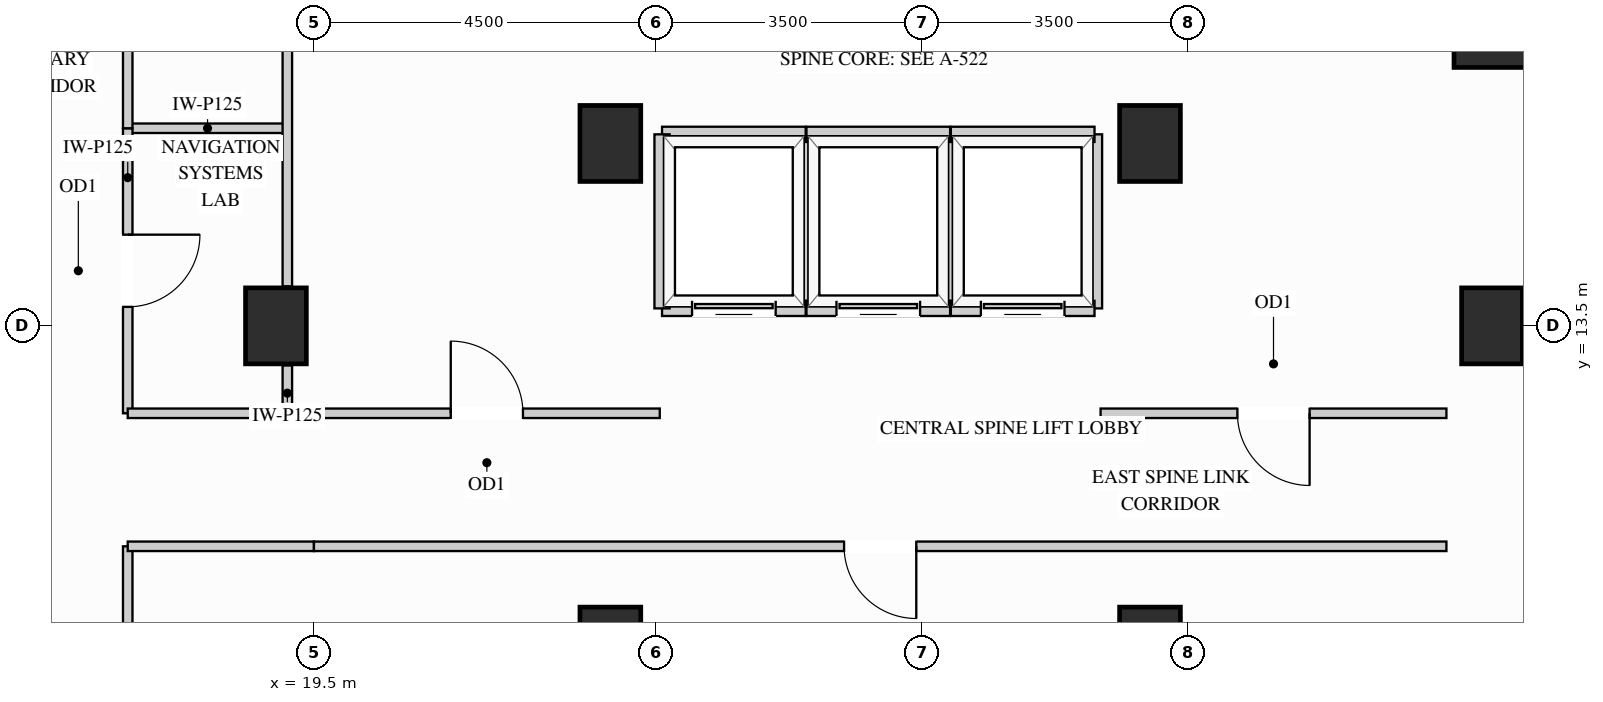
"""IFC4 building model, lengths in metres.
Left out: names, types, materials, properties, quantities, classifications, styles, units other than length and angle.
Written with IfcOpenShell. Run it as: python <this file> out.ifc"""

import sys

from ifc_helpers import new_model, si_unit, direction, frame, frame_2d, origin, origin_2d, place, context, subcontext, project, spatial, rectangle, extrude, source, transform, mapped, element, fill, save


model = new_model("IFC4")
c1 = context("Model", 3, precision=1e-05, world=origin(), true_north=direction((0.0, 1.0)))
c2 = subcontext(c1, "Body", "Model", "MODEL_VIEW")
j1 = project(units=[si_unit("LENGTHUNIT", "METRE"), si_unit("PLANEANGLEUNIT", "RADIAN")], contexts=[c1])
p1 = place(None, origin())
s1 = spatial("IfcSite", under=j1, at=p1, CompositionType="ELEMENT")
p2 = place(p1, origin())
s2 = spatial("IfcBuilding", under=s1, at=p2, CompositionType="ELEMENT")
p3 = place(p2, frame((0.0, 0.0, 193.5)))
s3 = spatial("IfcBuildingStorey", under=s2, at=p3, CompositionType="ELEMENT", Elevation=193.5)
m1 = source(origin(), c2, "Body", "SweptSolid", [
    extrude(rectangle(XDim=0.8, YDim=1.0, at=origin_2d()), origin(), (0.0, 0.0, 1.0), 3.4),
])
for number, where, z_axis, x_axis in (
    (1, (19.0, 13.5, 0.0), (0.0, 0.0, 1.0), (1.0, 0.0, 0.0)),
    (2, (35.0, 13.5, 0.0), (0.0, 0.0, 1.0), (1.0, 0.0, 0.0)),
    (3, (23.4, 15.9, 0.0), (0.0, 0.0, 1.0), (1.0, 0.0, 0.0)),
    (4, (23.4, 9.3, 0.0), (0.0, 0.0, 1.0), (1.0, 0.0, 0.0)),
    (5, (30.5, 15.9, 0.0), (0.0, 0.0, 1.0), (1.0, 0.0, 0.0)),
    (6, (30.5, 9.3, 0.0), (0.0, 0.0, 1.0), (1.0, 0.0, 0.0)),
):
    element("IfcColumn", number, at=place(p3, frame(where, z_axis=z_axis, x_axis=x_axis)), inside=s3, PredefinedType="COLUMN", context=c2, shape_type="MappedRepresentation", body=[
        mapped(m1, transform((0.0, 0.0, 0.0), x_axis=(1.0, 0.0, 0.0), y_axis=(0.0, 1.0, 0.0), z_axis=(0.0, 0.0, 1.0))),
    ])
m2 = source(origin(), c2, "Body", "SweptSolid", [
    extrude(rectangle(XDim=1.0, YDim=1.0, at=origin_2d()), origin(), (0.0, 0.0, 1.0), 3.4),
])
p4 = place(p3, frame((35.0, 17.4, 0.0), z_axis=(0.0, 0.0, 1.0), x_axis=(1.0, 0.0, 0.0)))
e7 = element("IfcColumn", 7, at=p4, inside=s3, PredefinedType="COLUMN", context=c2, shape_type="MappedRepresentation", body=[
    mapped(m2, transform((0.0, 0.0, 0.0), x_axis=(1.0, 0.0, 0.0), y_axis=(0.0, 1.0, 0.0), z_axis=(0.0, 0.0, 1.0))),
])
m3 = source(origin(), c2, "Body", "SweptSolid", [
    extrude(rectangle(XDim=2.1, YDim=0.125, at=frame_2d((1.05, 0.0))), origin(), (0.0, 0.0, 1.0), 3.385),
])
p5 = place(p3, frame((17.05, 16.1, 0.0), z_axis=(0.0, 0.0, 1.0), x_axis=(1.0, 0.0, 0.0)))
e8 = element("IfcWall", 8, at=p5, inside=s3, PredefinedType="PARTITIONING", context=c2, shape_type="MappedRepresentation", body=[
    mapped(m3, transform((0.0, 0.0, 0.0), x_axis=(1.0, 0.0, 0.0), y_axis=(0.0, 1.0, 0.0), z_axis=(0.0, 0.0, 1.0))),
])
m4 = source(origin(), c2, "Body", "SweptSolid", [
    extrude(rectangle(XDim=0.63, YDim=0.125, at=frame_2d((0.315, 0.0))), origin(), (0.0, 0.0, 1.0), 2.773),
])
p6 = place(p3, frame((19.15, 12.35, 0.0), z_axis=(0.0, 0.0, 1.0), x_axis=(0.0, 1.0, 0.0)))
e9 = element("IfcWall", 9, at=p6, inside=s3, PredefinedType="PARTITIONING", context=c2, shape_type="MappedRepresentation", body=[
    mapped(m4, transform((0.0, 0.0, 0.0), x_axis=(1.0, 0.0, 0.0), y_axis=(0.0, 1.0, 0.0), z_axis=(0.0, 0.0, 1.0))),
])
m5 = source(origin(), c2, "Body", "SweptSolid", [
    extrude(rectangle(XDim=3.46, YDim=0.125, at=frame_2d((1.73, 0.0))), origin(), (0.0, 0.0, 1.0), 2.773),
])
p7 = place(p3, frame((19.15, 14.02, 0.0), z_axis=(0.0, 0.0, 1.0), x_axis=(0.0, 1.0, 0.0)))
e10 = element("IfcWall", 10, at=p7, inside=s3, PredefinedType="PARTITIONING", context=c2, shape_type="MappedRepresentation", body=[
    mapped(m5, transform((0.0, 0.0, 0.0), x_axis=(1.0, 0.0, 0.0), y_axis=(0.0, 1.0, 0.0), z_axis=(0.0, 0.0, 1.0))),
])
p8 = place(p3, frame((17.05, 12.35, 0.0), z_axis=(0.0, 0.0, 1.0), x_axis=(0.0, 1.0, 0.0)))
e11 = element("IfcWall", 11, at=p8, inside=s3, PredefinedType="PARTITIONING", context=c2, shape_type="SweptSolid", body=[
    extrude(rectangle(XDim=3.75, YDim=0.125, at=frame_2d((1.875, 0.0))), origin(), (0.0, 0.0, 1.0), 3.385),
])
p9 = place(p8, frame((1.4, 0.0, 0.0)))
e12 = element("IfcOpeningElement", 12, at=p9, cuts=e11, PredefinedType="OPENING", context=c2, shape_type="SweptSolid", body=[
    extrude(rectangle(XDim=0.95, YDim=2.15, at=frame_2d((0.475, 1.075))), frame((0.0, 0.073, 0.0), z_axis=(0.0, -1.0, 0.0), x_axis=(1.0, 0.0, 0.0)), (0.0, 0.0, 1.0), 0.145),
])
p10 = place(p3, frame((17.05, 16.1, 0.0), z_axis=(0.0, 0.0, 1.0), x_axis=(0.0, 1.0, 0.0)))
e13 = element("IfcWall", 13, at=p10, inside=s3, PredefinedType="PARTITIONING", context=c2, shape_type="SweptSolid", body=[
    extrude(rectangle(XDim=7.25, YDim=0.125, at=frame_2d((3.625, 0.0))), origin(), (0.0, 0.0, 1.0), 3.385),
])
p11 = place(p10, frame((3.15, 0.0, 0.0)))
e14 = element("IfcOpeningElement", 14, at=p11, cuts=e13, PredefinedType="OPENING", context=c2, shape_type="SweptSolid", body=[
    extrude(rectangle(XDim=0.95, YDim=2.15, at=frame_2d((0.475, 1.075))), frame((0.0, 0.073, 0.0), z_axis=(0.0, -1.0, 0.0), x_axis=(1.0, 0.0, 0.0)), (0.0, 0.0, 1.0), 0.145),
])
p12 = place(p3, frame((17.05, 4.65, 0.0), z_axis=(0.0, 0.0, 1.0), x_axis=(0.0, 1.0, 0.0)))
e15 = element("IfcWall", 15, at=p12, inside=s3, PredefinedType="PARTITIONING", context=c2, shape_type="SweptSolid", body=[
    extrude(rectangle(XDim=5.95, YDim=0.125, at=frame_2d((2.975, 0.0))), origin(), (0.0, 0.0, 1.0), 3.385),
])
p13 = place(p12, frame((2.5, 0.0, 0.0)))
e16 = element("IfcOpeningElement", 16, at=p13, cuts=e15, PredefinedType="OPENING", context=c2, shape_type="SweptSolid", body=[
    extrude(rectangle(XDim=0.95, YDim=2.15, at=frame_2d((0.475, 1.075))), frame((0.0, 0.073, 0.0), z_axis=(0.0, -1.0, 0.0), x_axis=(1.0, 0.0, 0.0)), (0.0, 0.0, 1.0), 0.145),
])
p14 = place(p3, frame((29.85, 12.35, 0.0), z_axis=(0.0, 0.0, 1.0), x_axis=(1.0, 0.0, 0.0)))
e17 = element("IfcWall", 17, at=p14, inside=s3, PredefinedType="PARTITIONING", context=c2, shape_type="SweptSolid", body=[
    extrude(rectangle(XDim=4.55, YDim=0.125, at=frame_2d((2.275, 0.0))), origin(), (0.0, 0.0, 1.0), 3.385),
])
p15 = place(p14, frame((1.8, 0.0, 0.0)))
e18 = element("IfcOpeningElement", 18, at=p15, cuts=e17, PredefinedType="OPENING", context=c2, shape_type="SweptSolid", body=[
    extrude(rectangle(XDim=0.95, YDim=2.15, at=frame_2d((0.475, 1.075))), frame((0.0, 0.073, 0.0), z_axis=(0.0, -1.0, 0.0), x_axis=(1.0, 0.0, 0.0)), (0.0, 0.0, 1.0), 0.145),
])
m6 = source(origin(), c2, "Body", "SweptSolid", [
    extrude(rectangle(XDim=2.45, YDim=0.125, at=frame_2d((1.225, 0.0))), origin(), (0.0, 0.0, 1.0), 3.385),
])
p16 = place(p3, frame((17.05, 12.35, 0.0), z_axis=(0.0, 0.0, 1.0), x_axis=(1.0, 0.0, 0.0)))
e19 = element("IfcWall", 19, at=p16, inside=s3, PredefinedType="PARTITIONING", context=c2, shape_type="MappedRepresentation", body=[
    mapped(m6, transform((0.0, 0.0, 0.0), x_axis=(1.0, 0.0, 0.0), y_axis=(0.0, 1.0, 0.0), z_axis=(0.0, 0.0, 1.0))),
])
p17 = place(p3, frame((19.5, 12.35, 0.0), z_axis=(0.0, 0.0, 1.0), x_axis=(1.0, 0.0, 0.0)))
e20 = element("IfcWall", 20, at=p17, inside=s3, PredefinedType="PARTITIONING", context=c2, shape_type="SweptSolid", body=[
    extrude(rectangle(XDim=4.55, YDim=0.125, at=frame_2d((2.275, 0.0))), origin(), (0.0, 0.0, 1.0), 3.385),
])
p18 = place(p17, frame((1.8, 0.0, 0.0)))
e21 = element("IfcOpeningElement", 21, at=p18, cuts=e20, PredefinedType="OPENING", context=c2, shape_type="SweptSolid", body=[
    extrude(rectangle(XDim=0.95, YDim=2.15, at=frame_2d((0.475, 1.075))), frame((0.0, 0.073, 0.0), z_axis=(0.0, -1.0, 0.0), x_axis=(1.0, 0.0, 0.0)), (0.0, 0.0, 1.0), 0.145),
])
p19 = place(p3, frame((17.05, 10.6, 0.0), z_axis=(0.0, 0.0, 1.0), x_axis=(1.0, 0.0, 0.0)))
e22 = element("IfcWall", 22, at=p19, inside=s3, PredefinedType="PARTITIONING", context=c2, shape_type="MappedRepresentation", body=[
    mapped(m6, transform((0.0, 0.0, 0.0), x_axis=(1.0, 0.0, 0.0), y_axis=(0.0, 1.0, 0.0), z_axis=(0.0, 0.0, 1.0))),
])
p20 = place(p3, frame((19.5, 10.6, 0.0), z_axis=(0.0, 0.0, 1.0), x_axis=(1.0, 0.0, 0.0)))
e23 = element("IfcWall", 23, at=p20, inside=s3, PredefinedType="PARTITIONING", context=c2, shape_type="SweptSolid", body=[
    extrude(rectangle(XDim=14.9, YDim=0.125, at=frame_2d((7.45, 0.0))), origin(), (0.0, 0.0, 1.0), 3.385),
])
p21 = place(p20, frame((6.975, 0.0, 0.0)))
e24 = element("IfcOpeningElement", 24, at=p21, cuts=e23, PredefinedType="OPENING", context=c2, shape_type="SweptSolid", body=[
    extrude(rectangle(XDim=0.95, YDim=2.15, at=frame_2d((0.475, 1.075))), frame((0.0, 0.073, 0.0), z_axis=(0.0, -1.0, 0.0), x_axis=(1.0, 0.0, 0.0)), (0.0, 0.0, 1.0), 0.145),
])
m7 = source(origin(), c2, "Body", "SweptSolid", [
    extrude(rectangle(XDim=2.29, YDim=0.2, at=frame_2d((1.145, 0.0))), origin(), (0.0, 0.0, 1.0), 3.385),
])
p22 = place(p3, frame((25.97, 13.73, 0.0), z_axis=(0.0, 0.0, 1.0), x_axis=(0.0, 1.0, 0.0)))
e25 = element("IfcWall", 25, at=p22, inside=s3, PredefinedType="PARTITIONING", context=c2, shape_type="MappedRepresentation", body=[
    mapped(m7, transform((0.0, 0.0, 0.0), x_axis=(1.0, 0.0, 0.0), y_axis=(0.0, 1.0, 0.0), z_axis=(0.0, 0.0, 1.0))),
])
m8 = source(origin(), c2, "Body", "SweptSolid", [
    extrude(rectangle(XDim=1.89, YDim=0.2, at=frame_2d((0.945, 0.0))), origin(), (0.0, 0.0, 1.0), 2.773),
])
p23 = place(p3, frame((24.08, 16.02, 0.0), z_axis=(0.0, 0.0, 1.0), x_axis=(1.0, 0.0, 0.0)))
e26 = element("IfcWall", 26, at=p23, inside=s3, PredefinedType="PARTITIONING", context=c2, shape_type="MappedRepresentation", body=[
    mapped(m8, transform((0.0, 0.0, 0.0), x_axis=(1.0, 0.0, 0.0), y_axis=(0.0, 1.0, 0.0), z_axis=(0.0, 0.0, 1.0))),
])
p24 = place(p3, frame((24.08, 13.73, 0.0), z_axis=(0.0, 0.0, 1.0), x_axis=(1.0, 0.0, 0.0)))
e27 = element("IfcWall", 27, at=p24, inside=s3, PredefinedType="PARTITIONING", context=c2, shape_type="SweptSolid", body=[
    extrude(rectangle(XDim=1.89, YDim=0.2, at=frame_2d((0.945, 0.0))), origin(), (0.0, 0.0, 1.0), 2.466),
])
p25 = place(p24, frame((0.395, 0.0, 0.0)))
e28 = element("IfcOpeningElement", 28, at=p25, cuts=e27, PredefinedType="OPENING", context=c2, shape_type="SweptSolid", body=[
    extrude(rectangle(XDim=1.1, YDim=2.2, at=frame_2d((0.55, 1.1))), frame((0.0, 0.11, 0.0), z_axis=(0.0, -1.0, 0.0), x_axis=(1.0, 0.0, 0.0)), (0.0, 0.0, 1.0), 0.22),
])
for number, where, z_axis, x_axis in (
    (29, (24.08, 13.73, 0.0), (0.0, 0.0, 1.0), (0.0, 1.0, 0.0)),
    (30, (27.87, 13.73, 0.0), (0.0, 0.0, 1.0), (0.0, 1.0, 0.0)),
):
    element("IfcWall", number, at=place(p3, frame(where, z_axis=z_axis, x_axis=x_axis)), inside=s3, PredefinedType="PARTITIONING", context=c2, shape_type="MappedRepresentation", body=[
        mapped(m7, transform((0.0, 0.0, 0.0), x_axis=(1.0, 0.0, 0.0), y_axis=(0.0, 1.0, 0.0), z_axis=(0.0, 0.0, 1.0))),
    ])
m9 = source(origin(), c2, "Body", "SweptSolid", [
    extrude(rectangle(XDim=1.89, YDim=0.2, at=frame_2d((0.945, 0.0))), origin(), (0.0, 0.0, 1.0), 2.773),
])
p26 = place(p3, frame((25.98, 16.02, 0.0), z_axis=(0.0, 0.0, 1.0), x_axis=(1.0, 0.0, 0.0)))
e31 = element("IfcWall", 31, at=p26, inside=s3, PredefinedType="PARTITIONING", context=c2, shape_type="MappedRepresentation", body=[
    mapped(m9, transform((0.0, 0.0, 0.0), x_axis=(1.0, 0.0, 0.0), y_axis=(0.0, 1.0, 0.0), z_axis=(0.0, 0.0, 1.0))),
])
p27 = place(p3, frame((25.98, 13.73, 0.0), z_axis=(0.0, 0.0, 1.0), x_axis=(1.0, 0.0, 0.0)))
e32 = element("IfcWall", 32, at=p27, inside=s3, PredefinedType="PARTITIONING", context=c2, shape_type="SweptSolid", body=[
    extrude(rectangle(XDim=1.89, YDim=0.2, at=frame_2d((0.945, 0.0))), origin(), (0.0, 0.0, 1.0), 2.466),
])
p28 = place(p27, frame((0.395, 0.0, 0.0)))
e33 = element("IfcOpeningElement", 33, at=p28, cuts=e32, PredefinedType="OPENING", context=c2, shape_type="SweptSolid", body=[
    extrude(rectangle(XDim=1.1, YDim=2.2, at=frame_2d((0.55, 1.1))), frame((0.0, 0.11, 0.0), z_axis=(0.0, -1.0, 0.0), x_axis=(1.0, 0.0, 0.0)), (0.0, 0.0, 1.0), 0.22),
])
p29 = place(p3, frame((29.77, 13.73, 0.0), z_axis=(0.0, 0.0, 1.0), x_axis=(0.0, 1.0, 0.0)))
e34 = element("IfcWall", 34, at=p29, inside=s3, PredefinedType="PARTITIONING", context=c2, shape_type="MappedRepresentation", body=[
    mapped(m7, transform((0.0, 0.0, 0.0), x_axis=(1.0, 0.0, 0.0), y_axis=(0.0, 1.0, 0.0), z_axis=(0.0, 0.0, 1.0))),
])
p30 = place(p3, frame((27.88, 16.02, 0.0), z_axis=(0.0, 0.0, 1.0), x_axis=(1.0, 0.0, 0.0)))
e35 = element("IfcWall", 35, at=p30, inside=s3, PredefinedType="PARTITIONING", context=c2, shape_type="MappedRepresentation", body=[
    mapped(m9, transform((0.0, 0.0, 0.0), x_axis=(1.0, 0.0, 0.0), y_axis=(0.0, 1.0, 0.0), z_axis=(0.0, 0.0, 1.0))),
])
p31 = place(p3, frame((27.88, 13.73, 0.0), z_axis=(0.0, 0.0, 1.0), x_axis=(1.0, 0.0, 0.0)))
e36 = element("IfcWall", 36, at=p31, inside=s3, PredefinedType="PARTITIONING", context=c2, shape_type="SweptSolid", body=[
    extrude(rectangle(XDim=1.89, YDim=0.2, at=frame_2d((0.945, 0.0))), origin(), (0.0, 0.0, 1.0), 2.466),
])
p32 = place(p31, frame((0.395, 0.0, 0.0)))
e37 = element("IfcOpeningElement", 37, at=p32, cuts=e36, PredefinedType="OPENING", context=c2, shape_type="SweptSolid", body=[
    extrude(rectangle(XDim=1.1, YDim=2.2, at=frame_2d((0.55, 1.1))), frame((0.0, 0.11, 0.0), z_axis=(0.0, -1.0, 0.0), x_axis=(1.0, 0.0, 0.0)), (0.0, 0.0, 1.0), 0.22),
])
m10 = source(origin(), c2, "Body", "SweptSolid", [
    extrude(rectangle(XDim=1.1, YDim=2.2, at=frame_2d((0.55, 1.1))), frame((0.0, 0.025, 0.0), z_axis=(0.0, -1.0, 0.0), x_axis=(1.0, 0.0, 0.0)), (0.0, 0.0, 1.0), 0.05),
])
p33 = place(p25, origin())
e38 = element("IfcDoor", 38, at=p33, inside=s3, OperationType="SLIDING_TO_LEFT", PredefinedType="DOOR", context=c2, shape_type="MappedRepresentation", body=[
    mapped(m10, transform((0.0, 0.0, 0.0), x_axis=(1.0, 0.0, 0.0), y_axis=(0.0, 1.0, 0.0), z_axis=(0.0, 0.0, 1.0))),
])
fill(e28, e38)
p34 = place(p28, origin())
e39 = element("IfcDoor", 39, at=p34, inside=s3, OperationType="SLIDING_TO_LEFT", PredefinedType="DOOR", context=c2, shape_type="MappedRepresentation", body=[
    mapped(m10, transform((0.0, 0.0, 0.0), x_axis=(1.0, 0.0, 0.0), y_axis=(0.0, 1.0, 0.0), z_axis=(0.0, 0.0, 1.0))),
])
fill(e33, e39)
p35 = place(p32, origin())
e40 = element("IfcDoor", 40, at=p35, inside=s3, OperationType="SLIDING_TO_LEFT", PredefinedType="DOOR", context=c2, shape_type="MappedRepresentation", body=[
    mapped(m10, transform((0.0, 0.0, 0.0), x_axis=(1.0, 0.0, 0.0), y_axis=(0.0, 1.0, 0.0), z_axis=(0.0, 0.0, 1.0))),
])
fill(e37, e40)
m11 = source(origin(), c2, "Body", "SweptSolid", [
    extrude(rectangle(XDim=0.95, YDim=2.15, at=frame_2d((0.475, 1.075))), frame((0.0, 0.025, 0.0), z_axis=(0.0, -1.0, 0.0), x_axis=(1.0, 0.0, 0.0)), (0.0, 0.0, 1.0), 0.05),
])
p36 = place(p9, origin())
e41 = element("IfcDoor", 41, at=p36, inside=s3, OperationType="SINGLE_SWING_RIGHT", PredefinedType="DOOR", context=c2, shape_type="MappedRepresentation", body=[
    mapped(m11, transform((0.0, 0.0, 0.0), x_axis=(1.0, 0.0, 0.0), y_axis=(0.0, 1.0, 0.0), z_axis=(0.0, 0.0, 1.0))),
])
fill(e12, e41)
p37 = place(p18, origin())
e42 = element("IfcDoor", 42, at=p37, inside=s3, OperationType="SINGLE_SWING_LEFT", PredefinedType="DOOR", context=c2, shape_type="MappedRepresentation", body=[
    mapped(m11, transform((0.0, 0.0, 0.0), x_axis=(1.0, 0.0, 0.0), y_axis=(0.0, 1.0, 0.0), z_axis=(0.0, 0.0, 1.0))),
])
fill(e21, e42)
p38 = place(p15, origin())
e43 = element("IfcDoor", 43, at=p38, inside=s3, OperationType="SINGLE_SWING_RIGHT", PredefinedType="DOOR", context=c2, shape_type="MappedRepresentation", body=[
    mapped(m11, transform((0.0, 0.0, 0.0), x_axis=(1.0, 0.0, 0.0), y_axis=(0.0, 1.0, 0.0), z_axis=(0.0, 0.0, 1.0))),
])
fill(e18, e43)
p39 = place(p21, origin())
e44 = element("IfcDoor", 44, at=p39, inside=s3, OperationType="SINGLE_SWING_RIGHT", PredefinedType="DOOR", context=c2, shape_type="MappedRepresentation", body=[
    mapped(m11, transform((0.0, 0.0, 0.0), x_axis=(1.0, 0.0, 0.0), y_axis=(0.0, 1.0, 0.0), z_axis=(0.0, 0.0, 1.0))),
])
fill(e24, e44)
save(model, sys.argv[1])
